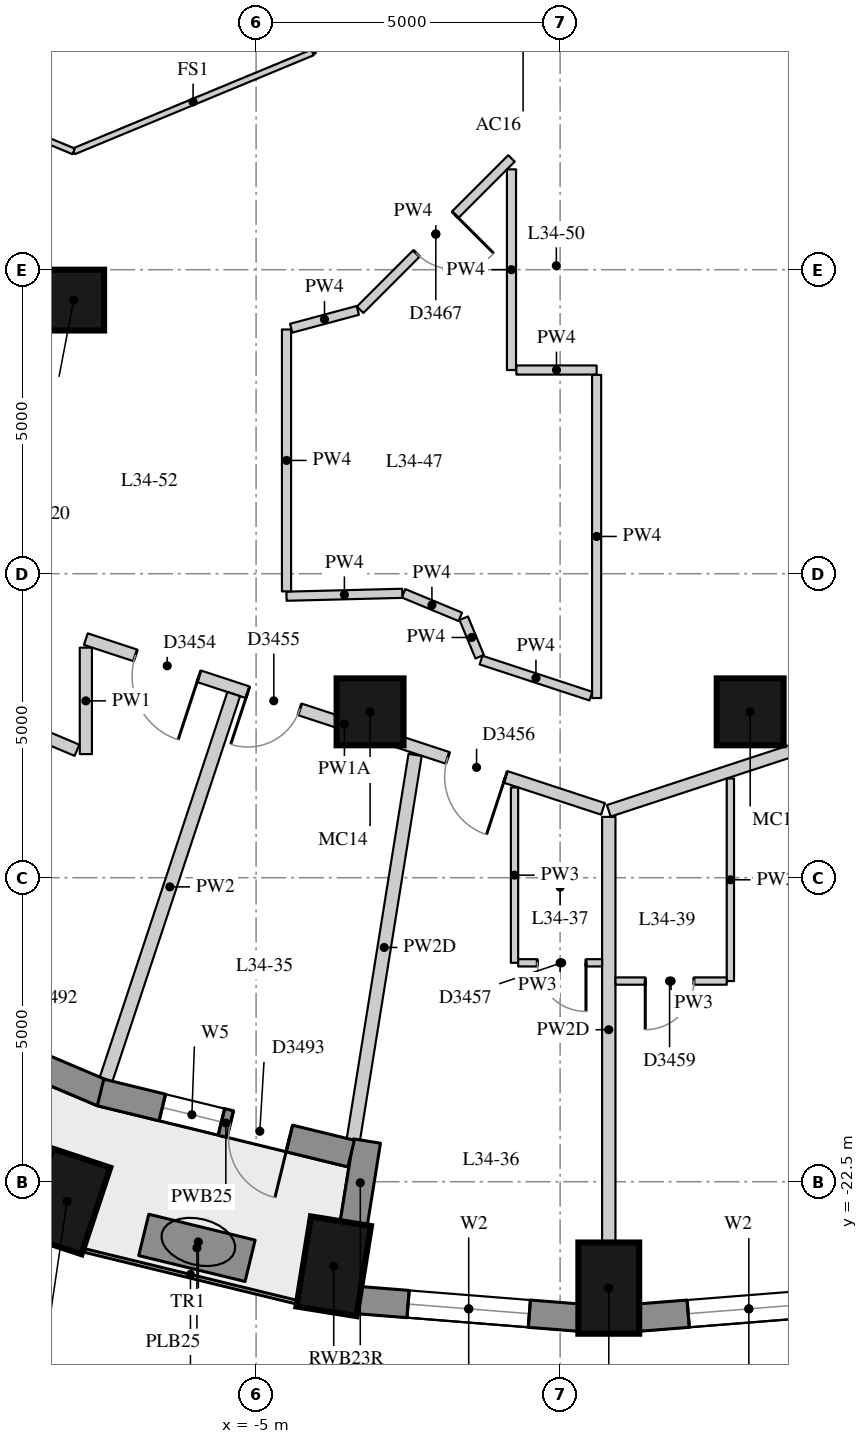
"""IFC4 building model, lengths in metres.
Left out: names, types, materials, properties, quantities, classifications, styles, units other than length and angle.
Written with IfcOpenShell. Run it as: python <this file> out.ifc"""

import sys

from ifc_helpers import new_model, si_unit, direction, frame, frame_2d, origin, origin_2d, place, context, subcontext, project, spatial, rectangle, extrude, element, fill, save


model = new_model("IFC4")
c1 = context("Model", 3, precision=1e-05, world=origin(), true_north=direction((0.0, 1.0)))
c2 = subcontext(c1, "Body", "Model", "MODEL_VIEW")
j1 = project(units=[si_unit("LENGTHUNIT", "METRE"), si_unit("PLANEANGLEUNIT", "RADIAN")], contexts=[c1])
p1 = place(None, origin())
s1 = spatial("IfcSite", under=j1, at=p1, CompositionType="ELEMENT")
p2 = place(p1, origin())
s2 = spatial("IfcBuilding", under=s1, at=p2, CompositionType="ELEMENT")
p3 = place(p2, frame((0.0, 0.0, 121.9)))
s3 = spatial("IfcBuildingStorey", under=s2, at=p3, CompositionType="ELEMENT", Elevation=121.9)
for number, where, z_axis, x_axis in (
    (1, (-8.11, -22.824, 0.0), (0.0, 0.0, 1.0), (-0.315, -0.949, 0.0)),
    (2, (-3.724, -23.891, 0.0), (0.0, 0.0, 1.0), (-0.159, -0.987, 0.0)),
    (3, (0.8, -24.25, 0.0), (0.0, 0.0, 1.0), (0.0, -1.0, 0.0)),
):
    element("IfcColumn", number, at=place(p3, frame(where, z_axis=z_axis, x_axis=x_axis)), inside=s3, PredefinedType="COLUMN", context=c2, shape_type="SweptSolid", body=[
        extrude(rectangle(XDim=1.5, YDim=1.0, at=origin_2d()), origin(), (0.0, 0.0, 1.0), 3.3),
    ])
p4 = place(p3, frame((-8.0, -8.0, 0.0), z_axis=(0.0, 0.0, 1.0), x_axis=(1.0, 0.0, 0.0)))
e4 = element("IfcColumn", 4, at=p4, inside=s3, PredefinedType="COLUMN", context=c2, shape_type="SweptSolid", body=[
    extrude(rectangle(XDim=1.0, YDim=1.0, at=origin_2d()), origin(), (0.0, 0.0, 1.0), 3.3),
])
for number, where, z_axis, x_axis in (
    (5, (-3.126, -14.772, 0.0), (0.0, 0.0, 1.0), (1.0, 0.0, 0.0)),
    (6, (3.126, -14.772, 0.0), (0.0, 0.0, 1.0), (1.0, 0.0, 0.0)),
):
    element("IfcColumn", number, at=place(p3, frame(where, z_axis=z_axis, x_axis=x_axis)), inside=s3, PredefinedType="COLUMN", context=c2, shape_type="SweptSolid", body=[
        extrude(rectangle(XDim=1.1, YDim=1.1, at=origin_2d()), origin(), (0.0, 0.0, 1.0), 3.3),
    ])
p5 = place(p3, frame((-3.327, -24.447, 0.0), z_axis=(0.0, 0.0, 1.0), x_axis=(0.996862216754, -0.079156306178, 0.0)))
e7 = element("IfcWall", 7, at=p5, inside=s3, PredefinedType="SOLIDWALL", context=c2, shape_type="SweptSolid", body=[
    extrude(rectangle(XDim=3.658, YDim=0.45, at=frame_2d((1.829, 0.0))), origin(), (0.0, 0.0, 1.0), 3.02),
])
p6 = place(p5, frame((0.829, 0.0, 0.4)))
e8 = element("IfcOpeningElement", 8, at=p6, cuts=e7, PredefinedType="OPENING", context=c2, shape_type="SweptSolid", body=[
    extrude(rectangle(XDim=2.0, YDim=1.75, at=frame_2d((1.0, 0.875))), frame((0.0, 0.235, 0.0), z_axis=(0.0, -1.0, 0.0), x_axis=(1.0, 0.0, 0.0)), (0.0, 0.0, 1.0), 0.47),
])
p7 = place(p3, frame((1.28, -24.736, 0.0), z_axis=(0.0, 0.0, 1.0), x_axis=(0.996862216754, 0.079156306178, 0.0)))
e9 = element("IfcWall", 9, at=p7, inside=s3, PredefinedType="SOLIDWALL", context=c2, shape_type="SweptSolid", body=[
    extrude(rectangle(XDim=3.658, YDim=0.45, at=frame_2d((1.829, 0.0))), origin(), (0.0, 0.0, 1.0), 3.02),
])
p8 = place(p7, frame((0.829, 0.0, 0.4)))
e10 = element("IfcOpeningElement", 10, at=p8, cuts=e9, PredefinedType="OPENING", context=c2, shape_type="SweptSolid", body=[
    extrude(rectangle(XDim=2.0, YDim=1.75, at=frame_2d((1.0, 0.875))), frame((0.0, 0.235, 0.0), z_axis=(0.0, -1.0, 0.0), x_axis=(1.0, 0.0, 0.0)), (0.0, 0.0, 1.0), 0.47),
])
p9 = place(p3, frame((-3.397, -23.204, 0.0), z_axis=(0.0, 0.0, 1.0), x_axis=(0.158415168535, 0.987372591466, 0.0)))
e11 = element("IfcWall", 11, at=p9, inside=s3, PredefinedType="SOLIDWALL", context=c2, shape_type="SweptSolid", body=[
    extrude(rectangle(XDim=1.39, YDim=0.45, at=frame_2d((0.695, 0.0))), origin(), (0.0, 0.0, 1.0), 2.47),
])
p10 = place(p3, frame((-11.396, -19.399, 0.0), z_axis=(0.0, 0.0, 1.0), x_axis=(0.920496400713, -0.390751041296, 0.0)))
e12 = element("IfcWall", 12, at=p10, inside=s3, PredefinedType="SOLIDWALL", context=c2, shape_type="SweptSolid", body=[
    extrude(rectangle(XDim=4.207, YDim=0.45, at=frame_2d((2.104, 0.0))), origin(), (0.0, 0.0, 1.0), 3.02),
])
p11 = place(p10, frame((1.028, 0.0, 0.4)))
e13 = element("IfcOpeningElement", 13, at=p11, cuts=e12, PredefinedType="OPENING", context=c2, shape_type="SweptSolid", body=[
    extrude(rectangle(XDim=1.0, YDim=1.75, at=frame_2d((0.5, 0.875))), frame((0.0, 0.235, 0.0), z_axis=(0.0, -1.0, 0.0), x_axis=(1.0, 0.0, 0.0)), (0.0, 0.0, 1.0), 0.47),
])
p12 = place(p10, frame((2.178, 0.0, 0.0)))
e14 = element("IfcOpeningElement", 14, at=p12, cuts=e12, PredefinedType="OPENING", context=c2, shape_type="SweptSolid", body=[
    extrude(rectangle(XDim=1.0, YDim=2.15, at=frame_2d((0.5, 1.075))), frame((0.0, 0.235, 0.0), z_axis=(0.0, -1.0, 0.0), x_axis=(1.0, 0.0, 0.0)), (0.0, 0.0, 1.0), 0.47),
])
p13 = place(p3, frame((-7.558, -21.032, 0.0), z_axis=(0.0, 0.0, 1.0), x_axis=(0.971511611373, -0.23699195971, 0.0)))
e15 = element("IfcWall", 15, at=p13, inside=s3, PredefinedType="SOLIDWALL", context=c2, shape_type="SweptSolid", body=[
    extrude(rectangle(XDim=4.241, YDim=0.45, at=frame_2d((2.121, 0.0))), origin(), (0.0, 0.0, 1.0), 3.02),
])
p14 = place(p13, frame((1.046, 0.0, 0.4)))
e16 = element("IfcOpeningElement", 16, at=p14, cuts=e15, PredefinedType="OPENING", context=c2, shape_type="SweptSolid", body=[
    extrude(rectangle(XDim=1.0, YDim=1.75, at=frame_2d((0.5, 0.875))), frame((0.0, 0.235, 0.0), z_axis=(0.0, -1.0, 0.0), x_axis=(1.0, 0.0, 0.0)), (0.0, 0.0, 1.0), 0.47),
])
p15 = place(p13, frame((2.196, 0.0, 0.0)))
e17 = element("IfcOpeningElement", 17, at=p15, cuts=e15, PredefinedType="OPENING", context=c2, shape_type="SweptSolid", body=[
    extrude(rectangle(XDim=1.0, YDim=2.15, at=frame_2d((0.5, 1.075))), frame((0.0, 0.235, 0.0), z_axis=(0.0, -1.0, 0.0), x_axis=(1.0, 0.0, 0.0)), (0.0, 0.0, 1.0), 0.47),
])
p16 = place(p3, frame((-6.848, -23.375, 0.0), z_axis=(0.0, 0.0, 1.0), x_axis=(0.971654974133, -0.23640349245, 0.0)))
e18 = element("IfcWall", 18, at=p16, inside=s3, PredefinedType="USERDEFINED", context=c2, shape_type="SweptSolid", body=[
    extrude(rectangle(XDim=1.8, YDim=0.7, at=frame_2d((0.9, 0.0))), origin(), (0.0, 0.0, 1.0), 0.75),
])
p17 = place(p3, frame((8.984, -13.713, 0.0), z_axis=(0.0, 0.0, 1.0), x_axis=(-0.950093687873, -0.311964716378, 0.0)))
e19 = element("IfcWall", 19, at=p17, inside=s3, PredefinedType="PARTITIONING", context=c2, shape_type="SweptSolid", body=[
    extrude(rectangle(XDim=8.614, YDim=0.2, at=frame_2d((4.307, 0.0))), origin(), (0.0, 0.0, 1.0), 3.02),
])
p18 = place(p17, frame((3.82, 0.0, 0.0)))
e20 = element("IfcOpeningElement", 20, at=p18, cuts=e19, PredefinedType="OPENING", context=c2, shape_type="SweptSolid", body=[
    extrude(rectangle(XDim=1.1, YDim=2.1, at=frame_2d((0.55, 1.05))), frame((0.0, 0.11, 0.0), z_axis=(0.0, -1.0, 0.0), x_axis=(1.0, 0.0, 0.0)), (0.0, 0.0, 1.0), 0.22),
])
p19 = place(p17, frame((0.22, 0.0, 0.0)))
e21 = element("IfcOpeningElement", 21, at=p19, cuts=e19, PredefinedType="OPENING", context=c2, shape_type="SweptSolid", body=[
    extrude(rectangle(XDim=1.1, YDim=2.1, at=frame_2d((0.55, 1.05))), frame((0.0, 0.11, 0.0), z_axis=(0.0, -1.0, 0.0), x_axis=(1.0, 0.0, 0.0)), (0.0, 0.0, 1.0), 0.22),
])
p20 = place(p3, frame((0.705, -16.368, 0.0), z_axis=(0.0, 0.0, 1.0), x_axis=(-0.95010544032, 0.311928921832, 0.0)))
e22 = element("IfcWall", 22, at=p20, inside=s3, PredefinedType="PARTITIONING", context=c2, shape_type="SweptSolid", body=[
    extrude(rectangle(XDim=8.951, YDim=0.2, at=frame_2d((4.476, 0.0))), origin(), (0.0, 0.0, 1.0), 2.57),
])
p21 = place(p20, frame((6.993, 0.0, 0.0)))
e23 = element("IfcOpeningElement", 23, at=p21, cuts=e22, PredefinedType="OPENING", context=c2, shape_type="SweptSolid", body=[
    extrude(rectangle(XDim=1.1, YDim=2.1, at=frame_2d((0.55, 1.05))), frame((0.0, 0.11, 0.0), z_axis=(0.0, -1.0, 0.0), x_axis=(1.0, 0.0, 0.0)), (0.0, 0.0, 1.0), 0.22),
])
p22 = place(p20, frame((5.248, 0.0, 0.0)))
e24 = element("IfcOpeningElement", 24, at=p22, cuts=e22, PredefinedType="OPENING", context=c2, shape_type="SweptSolid", body=[
    extrude(rectangle(XDim=0.9, YDim=2.1, at=frame_2d((0.45, 1.05))), frame((0.0, 0.11, 0.0), z_axis=(0.0, -1.0, 0.0), x_axis=(1.0, 0.0, 0.0)), (0.0, 0.0, 1.0), 0.22),
])
p23 = place(p20, frame((1.688, 0.0, 0.0)))
e25 = element("IfcOpeningElement", 25, at=p23, cuts=e22, PredefinedType="OPENING", context=c2, shape_type="SweptSolid", body=[
    extrude(rectangle(XDim=1.0, YDim=2.1, at=frame_2d((0.5, 1.05))), frame((0.0, 0.11, 0.0), z_axis=(0.0, -1.0, 0.0), x_axis=(1.0, 0.0, 0.0)), (0.0, 0.0, 1.0), 0.22),
])
p24 = place(p3, frame((-7.8, -13.716, 0.0), z_axis=(0.0, 0.0, 1.0), x_axis=(0.0, -1.0, 0.0)))
e26 = element("IfcWall", 26, at=p24, inside=s3, PredefinedType="PARTITIONING", context=c2, shape_type="SweptSolid", body=[
    extrude(rectangle(XDim=1.751, YDim=0.2, at=frame_2d((0.875, 0.0))), origin(), (0.0, 0.0, 1.0), 3.02),
])
p25 = place(p3, frame((-7.947, -15.404, 0.0), z_axis=(0.0, 0.0, 1.0), x_axis=(-0.920608906038, 0.390485905153, 0.0)))
e27 = element("IfcWall", 27, at=p25, inside=s3, PredefinedType="PARTITIONING", context=c2, shape_type="SweptSolid", body=[
    extrude(rectangle(XDim=1.177, YDim=0.2, at=frame_2d((0.588, 0.0))), origin(), (0.0, 0.0, 1.0), 3.02),
])
p26 = place(p3, frame((-3.29, -8.159, 0.0), z_axis=(0.0, 0.0, 1.0), x_axis=(0.707106781187, 0.707106781187, 0.0)))
e28 = element("IfcWall", 28, at=p26, inside=s3, PredefinedType="PARTITIONING", context=c2, shape_type="SweptSolid", body=[
    extrude(rectangle(XDim=3.521, YDim=0.15, at=frame_2d((1.76, 0.0))), origin(), (0.0, 0.0, 1.0), 3.02),
])
p27 = place(p26, frame((1.31, 0.0, 0.0)))
e29 = element("IfcOpeningElement", 29, at=p27, cuts=e28, PredefinedType="OPENING", context=c2, shape_type="SweptSolid", body=[
    extrude(rectangle(XDim=0.9, YDim=2.1, at=frame_2d((0.45, 1.05))), frame((0.0, 0.085, 0.0), z_axis=(0.0, -1.0, 0.0), x_axis=(1.0, 0.0, 0.0)), (0.0, 0.0, 1.0), 0.17),
])
p28 = place(p3, frame((-0.8, -5.85, 0.0), z_axis=(0.0, 0.0, 1.0), x_axis=(0.0, -1.0, 0.0)))
e30 = element("IfcWall", 30, at=p28, inside=s3, PredefinedType="PARTITIONING", context=c2, shape_type="SweptSolid", body=[
    extrude(rectangle(XDim=3.3, YDim=0.15, at=frame_2d((1.65, 0.0))), origin(), (0.0, 0.0, 1.0), 3.02),
])
p29 = place(p3, frame((-0.72, -9.15, 0.0), z_axis=(0.0, 0.0, 1.0), x_axis=(1.0, 0.0, 0.0)))
e31 = element("IfcWall", 31, at=p29, inside=s3, PredefinedType="PARTITIONING", context=c2, shape_type="SweptSolid", body=[
    extrude(rectangle(XDim=1.32, YDim=0.15, at=frame_2d((0.66, 0.0))), origin(), (0.0, 0.0, 1.0), 3.02),
])
p30 = place(p3, frame((0.6, -9.23, 0.0), z_axis=(0.0, 0.0, 1.0), x_axis=(0.0, -1.0, 0.0)))
e32 = element("IfcWall", 32, at=p30, inside=s3, PredefinedType="PARTITIONING", context=c2, shape_type="SweptSolid", body=[
    extrude(rectangle(XDim=5.315, YDim=0.15, at=frame_2d((2.657, 0.0))), origin(), (0.0, 0.0, 1.0), 3.02),
])
p31 = place(p3, frame((0.505, -14.513, 0.0), z_axis=(0.0, 0.0, 1.0), x_axis=(-0.950175898888, 0.31171422998, 0.0)))
e33 = element("IfcWall", 33, at=p31, inside=s3, PredefinedType="PARTITIONING", context=c2, shape_type="SweptSolid", body=[
    extrude(rectangle(XDim=1.9, YDim=0.15, at=frame_2d((0.95, 0.0))), origin(), (0.0, 0.0, 1.0), 3.02),
])
p32 = place(p3, frame((-1.323, -13.865, 0.0), z_axis=(0.0, 0.0, 1.0), x_axis=(-0.382970536008, 0.923760558018, 0.0)))
e34 = element("IfcWall", 34, at=p32, inside=s3, PredefinedType="PARTITIONING", context=c2, shape_type="SweptSolid", body=[
    extrude(rectangle(XDim=0.685, YDim=0.15, at=frame_2d((0.343, 0.0))), origin(), (0.0, 0.0, 1.0), 3.02),
])
p33 = place(p3, frame((-1.641, -13.209, 0.0), z_axis=(0.0, 0.0, 1.0), x_axis=(-0.923725449546, 0.383055209937, 0.0)))
e35 = element("IfcWall", 35, at=p33, inside=s3, PredefinedType="PARTITIONING", context=c2, shape_type="SweptSolid", body=[
    extrude(rectangle(XDim=1.011, YDim=0.15, at=frame_2d((0.506, 0.0))), origin(), (0.0, 0.0, 1.0), 3.02),
])
p34 = place(p3, frame((-2.596, -12.823, 0.0), z_axis=(0.0, 0.0, 1.0), x_axis=(-0.999684436087, -0.025120275573, 0.0)))
e36 = element("IfcWall", 36, at=p34, inside=s3, PredefinedType="PARTITIONING", context=c2, shape_type="SweptSolid", body=[
    extrude(rectangle(XDim=1.905, YDim=0.15, at=frame_2d((0.952, 0.0))), origin(), (0.0, 0.0, 1.0), 3.02),
])
p35 = place(p3, frame((-4.5, -12.79, 0.0), z_axis=(0.0, 0.0, 1.0), x_axis=(0.0, 1.0, 0.0)))
e37 = element("IfcWall", 37, at=p35, inside=s3, PredefinedType="PARTITIONING", context=c2, shape_type="SweptSolid", body=[
    extrude(rectangle(XDim=4.307, YDim=0.15, at=frame_2d((2.154, 0.0))), origin(), (0.0, 0.0, 1.0), 3.02),
])
p36 = place(p3, frame((-4.423, -8.463, 0.0), z_axis=(0.0, 0.0, 1.0), x_axis=(0.965898042479, 0.258922713439, 0.0)))
e38 = element("IfcWall", 38, at=p36, inside=s3, PredefinedType="PARTITIONING", context=c2, shape_type="SweptSolid", body=[
    extrude(rectangle(XDim=1.133, YDim=0.15, at=frame_2d((0.567, 0.0))), origin(), (0.0, 0.0, 1.0), 3.02),
])
p37 = place(p3, frame((-7.469, -20.822, 0.0), z_axis=(0.0, 0.0, 1.0), x_axis=(0.314560923857, 0.949237286026, 0.0)))
e39 = element("IfcWall", 39, at=p37, inside=s3, PredefinedType="PARTITIONING", context=c2, shape_type="SweptSolid", body=[
    extrude(rectangle(XDim=6.681, YDim=0.22, at=frame_2d((3.34, 0.0))), origin(), (0.0, 0.0, 1.0), 3.02),
])
p38 = place(p3, frame((-3.402, -21.814, 0.0), z_axis=(0.0, 0.0, 1.0), x_axis=(0.158514453841, 0.987356656899, 0.0)))
e40 = element("IfcWall", 40, at=p38, inside=s3, PredefinedType="PARTITIONING", context=c2, shape_type="SweptSolid", body=[
    extrude(rectangle(XDim=6.415, YDim=0.22, at=frame_2d((3.208, 0.0))), origin(), (0.0, 0.0, 1.0), 2.47),
])
p39 = place(p3, frame((0.8, -23.5, 0.0), z_axis=(0.0, 0.0, 1.0), x_axis=(0.0, 1.0, 0.0)))
e41 = element("IfcWall", 41, at=p39, inside=s3, PredefinedType="PARTITIONING", context=c2, shape_type="SweptSolid", body=[
    extrude(rectangle(XDim=7.0, YDim=0.22, at=frame_2d((3.5, 0.0))), origin(), (0.0, 0.0, 1.0), 2.47),
])
p40 = place(p3, frame((-0.75, -16.016, 0.0), z_axis=(0.0, 0.0, 1.0), x_axis=(0.0, -1.0, 0.0)))
e42 = element("IfcWall", 42, at=p40, inside=s3, PredefinedType="PARTITIONING", context=c2, shape_type="SweptSolid", body=[
    extrude(rectangle(XDim=2.884, YDim=0.12, at=frame_2d((1.442, 0.0))), origin(), (0.0, 0.0, 1.0), 3.02),
])
p41 = place(p3, frame((2.8, -15.868, 0.0), z_axis=(0.0, 0.0, 1.0), x_axis=(0.0, -1.0, 0.0)))
e43 = element("IfcWall", 43, at=p41, inside=s3, PredefinedType="PARTITIONING", context=c2, shape_type="SweptSolid", body=[
    extrude(rectangle(XDim=3.332, YDim=0.12, at=frame_2d((1.666, 0.0))), origin(), (0.0, 0.0, 1.0), 3.02),
])
p42 = place(p3, frame((-0.69, -18.9, 0.0), z_axis=(0.0, 0.0, 1.0), x_axis=(1.0, 0.0, 0.0)))
e44 = element("IfcWall", 44, at=p42, inside=s3, PredefinedType="PARTITIONING", context=c2, shape_type="SweptSolid", body=[
    extrude(rectangle(XDim=1.38, YDim=0.12, at=frame_2d((0.69, 0.0))), origin(), (0.0, 0.0, 1.0), 3.02),
])
p43 = place(p42, frame((0.315, 0.0, 0.0)))
e45 = element("IfcOpeningElement", 45, at=p43, cuts=e44, PredefinedType="OPENING", context=c2, shape_type="SweptSolid", body=[
    extrude(rectangle(XDim=0.8, YDim=2.1, at=frame_2d((0.4, 1.05))), frame((0.0, 0.07, 0.0), z_axis=(0.0, -1.0, 0.0), x_axis=(1.0, 0.0, 0.0)), (0.0, 0.0, 1.0), 0.14),
])
p44 = place(p3, frame((2.74, -19.2, 0.0), z_axis=(0.0, 0.0, 1.0), x_axis=(-1.0, 0.0, 0.0)))
e46 = element("IfcWall", 46, at=p44, inside=s3, PredefinedType="PARTITIONING", context=c2, shape_type="SweptSolid", body=[
    extrude(rectangle(XDim=1.83, YDim=0.12, at=frame_2d((0.915, 0.0))), origin(), (0.0, 0.0, 1.0), 3.02),
])
p45 = place(p44, frame((0.54, 0.0, 0.0)))
e47 = element("IfcOpeningElement", 47, at=p45, cuts=e46, PredefinedType="OPENING", context=c2, shape_type="SweptSolid", body=[
    extrude(rectangle(XDim=0.8, YDim=2.1, at=frame_2d((0.4, 1.05))), frame((0.0, 0.07, 0.0), z_axis=(0.0, -1.0, 0.0), x_axis=(1.0, 0.0, 0.0)), (0.0, 0.0, 1.0), 0.14),
])
for number, where, z_axis, x_axis in (
    (48, (-2.446, 0.0, 0.0), (0.0, 0.0, 1.0), (-0.383, -0.924, 0.0)),
    (49, (-4.073, -3.927, 0.0), (0.0, 0.0, 1.0), (-0.924, -0.383, 0.0)),
    (50, (-8.0, -5.554, 0.0), (0.0, 0.0, 1.0), (-0.924, 0.383, 0.0)),
):
    element("IfcWall", number, at=place(p3, frame(where, z_axis=z_axis, x_axis=x_axis)), inside=s3, PredefinedType="PARTITIONING", context=c2, shape_type="SweptSolid", body=[
        extrude(rectangle(XDim=4.251, YDim=0.1, at=frame_2d((2.125, 0.0))), origin(), (0.0, 0.0, 1.0), 3.02),
    ])
p46 = place(p6, origin())
e51 = element("IfcWindow", 51, at=p46, inside=s3, PartitioningType="SINGLE_PANEL", PredefinedType="WINDOW", context=c2, shape_type="SweptSolid", body=[
    extrude(rectangle(XDim=2.0, YDim=1.75, at=frame_2d((1.0, 0.875))), frame((0.0, 0.035, 0.0), z_axis=(0.0, -1.0, 0.0), x_axis=(1.0, 0.0, 0.0)), (0.0, 0.0, 1.0), 0.06),
])
fill(e8, e51)
p47 = place(p8, origin())
e52 = element("IfcWindow", 52, at=p47, inside=s3, PartitioningType="SINGLE_PANEL", PredefinedType="WINDOW", context=c2, shape_type="SweptSolid", body=[
    extrude(rectangle(XDim=2.0, YDim=1.75, at=frame_2d((1.0, 0.875))), frame((0.0, 0.035, 0.0), z_axis=(0.0, -1.0, 0.0), x_axis=(1.0, 0.0, 0.0)), (0.0, 0.0, 1.0), 0.06),
])
fill(e10, e52)
p48 = place(p14, origin())
e53 = element("IfcWindow", 53, at=p48, inside=s3, PartitioningType="SINGLE_PANEL", PredefinedType="WINDOW", context=c2, shape_type="SweptSolid", body=[
    extrude(rectangle(XDim=1.0, YDim=1.75, at=frame_2d((0.5, 0.875))), frame((0.0, 0.035, 0.0), z_axis=(0.0, -1.0, 0.0), x_axis=(1.0, 0.0, 0.0)), (0.0, 0.0, 1.0), 0.06),
])
fill(e16, e53)
p49 = place(p15, frame((1.0, 0.0, 0.0), z_axis=(0.0, 0.0, 1.0), x_axis=(-1.0, 0.0, 0.0)))
e54 = element("IfcDoor", 54, at=p49, inside=s3, OperationType="SINGLE_SWING_LEFT", PredefinedType="DOOR", context=c2, shape_type="SweptSolid", body=[
    extrude(rectangle(XDim=1.0, YDim=2.15, at=frame_2d((0.5, 1.075))), frame((0.0, 0.075, 0.0), z_axis=(0.0, -1.0, 0.0), x_axis=(1.0, 0.0, 0.0)), (0.0, 0.0, 1.0), 0.05),
])
fill(e17, e54)
p50 = place(p21, origin())
e55 = element("IfcDoor", 55, at=p50, inside=s3, OperationType="SINGLE_SWING_LEFT", PredefinedType="DOOR", context=c2, shape_type="SweptSolid", body=[
    extrude(rectangle(XDim=1.1, YDim=2.1, at=frame_2d((0.55, 1.05))), frame((0.0, 0.025, 0.0), z_axis=(0.0, -1.0, 0.0), x_axis=(1.0, 0.0, 0.0)), (0.0, 0.0, 1.0), 0.05),
])
fill(e23, e55)
p51 = place(p22, origin())
e56 = element("IfcDoor", 56, at=p51, inside=s3, OperationType="SINGLE_SWING_RIGHT", PredefinedType="DOOR", context=c2, shape_type="SweptSolid", body=[
    extrude(rectangle(XDim=0.9, YDim=2.1, at=frame_2d((0.45, 1.05))), frame((0.0, 0.025, 0.0), z_axis=(0.0, -1.0, 0.0), x_axis=(1.0, 0.0, 0.0)), (0.0, 0.0, 1.0), 0.05),
])
fill(e24, e56)
p52 = place(p23, origin())
e57 = element("IfcDoor", 57, at=p52, inside=s3, OperationType="SINGLE_SWING_LEFT", PredefinedType="DOOR", context=c2, shape_type="SweptSolid", body=[
    extrude(rectangle(XDim=1.0, YDim=2.1, at=frame_2d((0.5, 1.05))), frame((0.0, 0.025, 0.0), z_axis=(0.0, -1.0, 0.0), x_axis=(1.0, 0.0, 0.0)), (0.0, 0.0, 1.0), 0.05),
])
fill(e25, e57)
p53 = place(p43, origin())
e58 = element("IfcDoor", 58, at=p53, inside=s3, OperationType="SINGLE_SWING_LEFT", PredefinedType="DOOR", context=c2, shape_type="SweptSolid", body=[
    extrude(rectangle(XDim=0.8, YDim=2.1, at=frame_2d((0.4, 1.05))), frame((0.0, 0.025, 0.0), z_axis=(0.0, -1.0, 0.0), x_axis=(1.0, 0.0, 0.0)), (0.0, 0.0, 1.0), 0.05),
])
fill(e45, e58)
p54 = place(p45, origin())
e59 = element("IfcDoor", 59, at=p54, inside=s3, OperationType="SINGLE_SWING_RIGHT", PredefinedType="DOOR", context=c2, shape_type="SweptSolid", body=[
    extrude(rectangle(XDim=0.8, YDim=2.1, at=frame_2d((0.4, 1.05))), frame((0.0, 0.025, 0.0), z_axis=(0.0, -1.0, 0.0), x_axis=(1.0, 0.0, 0.0)), (0.0, 0.0, 1.0), 0.05),
])
fill(e47, e59)
p55 = place(p27, origin())
e60 = element("IfcDoor", 60, at=p55, inside=s3, OperationType="SINGLE_SWING_LEFT", PredefinedType="DOOR", context=c2, shape_type="SweptSolid", body=[
    extrude(rectangle(XDim=0.9, YDim=2.1, at=frame_2d((0.45, 1.05))), frame((0.0, 0.025, 0.0), z_axis=(0.0, -1.0, 0.0), x_axis=(1.0, 0.0, 0.0)), (0.0, 0.0, 1.0), 0.05),
])
fill(e29, e60)
save(model, sys.argv[1])
